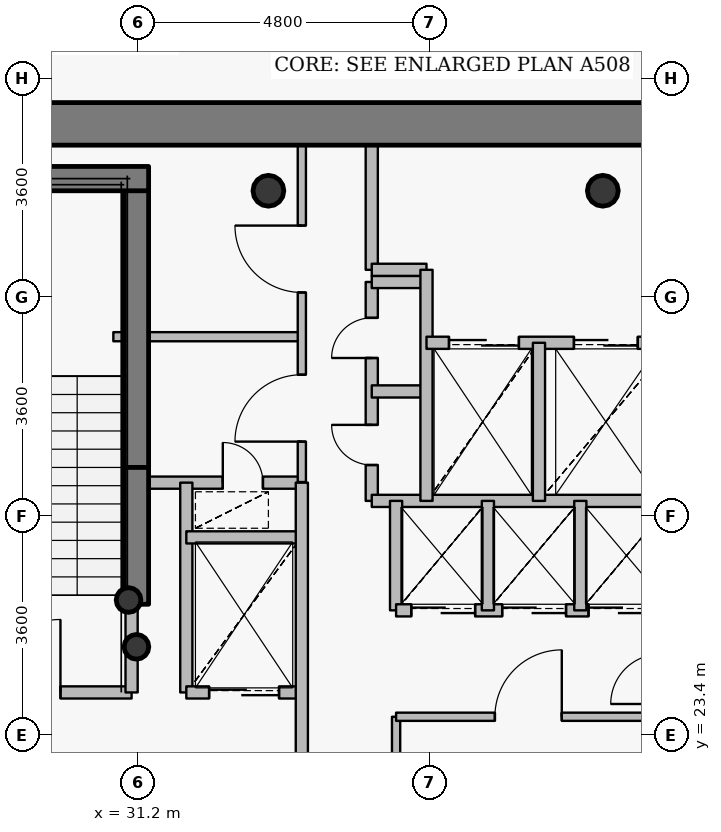
"""IFC4 building model, lengths in metres.
Left out: names, types, materials, properties, quantities, classifications, styles, units other than length and angle.
Written with IfcOpenShell. Run it as: python <this file> out.ifc"""

import sys

from ifc_helpers import new_model, si_unit, direction, frame, frame_2d, origin, origin_2d, place, context, subcontext, project, spatial, rectangle, hollow_circle, extrude, source, transform, mapped, element, fill, save


model = new_model("IFC4")
c1 = context("Model", 3, precision=1e-05, world=origin(), true_north=direction((0.0, 1.0)))
c2 = subcontext(c1, "Body", "Model", "MODEL_VIEW")
j1 = project(units=[si_unit("LENGTHUNIT", "METRE"), si_unit("PLANEANGLEUNIT", "RADIAN")], contexts=[c1])
p1 = place(None, origin())
s1 = spatial("IfcSite", under=j1, at=p1, CompositionType="ELEMENT")
p2 = place(p1, origin())
s2 = spatial("IfcBuilding", under=s1, at=p2, CompositionType="ELEMENT")
p3 = place(p2, frame((0.0, 0.0, 284.25)))
s3 = spatial("IfcBuildingStorey", under=s2, at=p3, CompositionType="ELEMENT", Elevation=284.25)
for number, where, z_axis, x_axis in (
    (1, (38.85, 32.35, 0.0), (0.0, 0.0, 1.0), (1.0, 0.0, 0.0)),
    (2, (33.35, 32.35, 0.0), (0.0, 0.0, 1.0), (1.0, 0.0, 0.0)),
):
    element("IfcColumn", number, at=place(p3, frame(where, z_axis=z_axis, x_axis=x_axis)), inside=s3, PredefinedType="COLUMN", context=c2, shape_type="SweptSolid", body=[
        extrude(hollow_circle(Radius=0.254, WallThickness=0.02, at=origin_2d()), origin(), (0.0, 0.0, 1.0), 3.75),
    ])
p4 = place(p3, frame((31.18, 27.8, 0.0), z_axis=(0.0, 0.0, 1.0), x_axis=(0.0, 1.0, 0.0)))
e3 = element("IfcWall", 3, at=p4, inside=s3, PredefinedType="SHEAR", context=c2, shape_type="SweptSolid", body=[
    extrude(rectangle(XDim=4.75, YDim=0.4, at=frame_2d((2.375, 0.0))), origin(), (0.0, 0.0, 1.0), 3.75),
])
p5 = place(p3, frame((27.25, 32.55, 0.0), z_axis=(0.0, 0.0, 1.0), x_axis=(1.0, 0.0, 0.0)))
e4 = element("IfcWall", 4, at=p5, inside=s3, PredefinedType="SHEAR", context=c2, shape_type="SweptSolid", body=[
    extrude(rectangle(XDim=4.13, YDim=0.4, at=frame_2d((2.065, 0.0))), origin(), (0.0, 0.0, 1.0), 3.75),
])
for number, where, z_axis, x_axis in (
    (5, (31.05, 25.62, 0.0), (0.0, 0.0, 1.0), (1.0, 0.0, 0.0)),
    (6, (31.18, 24.85, 0.0), (0.0, 0.0, 1.0), (1.0, 0.0, 0.0)),
):
    element("IfcColumn", number, at=place(p3, frame(where, z_axis=z_axis, x_axis=x_axis)), inside=s3, PredefinedType="COLUMN", context=c2, shape_type="SweptSolid", body=[
        extrude(hollow_circle(Radius=0.203, WallThickness=0.016, at=origin_2d()), origin(), (0.0, 0.0, 1.0), 3.75),
    ])
p6 = place(p3, frame((27.65, 33.45, 0.0), z_axis=(0.0, 0.0, 1.0), x_axis=(1.0, 0.0, 0.0)))
e7 = element("IfcWall", 7, at=p6, inside=s3, PredefinedType="SHEAR", context=c2, shape_type="SweptSolid", body=[
    extrude(rectangle(XDim=16.7, YDim=0.7, at=frame_2d((8.35, 0.0))), origin(), (0.0, 0.0, 1.0), 3.05),
])
p7 = place(p6, frame((12.775, 0.0, 0.0)))
e8 = element("IfcOpeningElement", 8, at=p7, cuts=e7, PredefinedType="OPENING", context=c2, shape_type="SweptSolid", body=[
    extrude(rectangle(XDim=1.15, YDim=2.15, at=origin_2d()), frame((0.575, 0.36, 1.075), z_axis=(0.0, -1.0, 0.0), x_axis=(1.0, 0.0, 0.0)), (0.0, 0.0, 1.0), 0.72),
])
p8 = place(p3, frame((31.18, 25.55, 0.0), z_axis=(0.0, 0.0, 1.0), x_axis=(0.0, 1.0, 0.0)))
e9 = element("IfcWall", 9, at=p8, inside=s3, PredefinedType="SHEAR", context=c2, shape_type="SweptSolid", body=[
    extrude(rectangle(XDim=2.25, YDim=0.4, at=frame_2d((1.125, 0.0))), origin(), (0.0, 0.0, 1.0), 3.1),
])
p9 = place(p3, frame((27.56, 24.1, 0.0), z_axis=(0.0, 0.0, 1.0), x_axis=(1.0, 0.0, 0.0)))
e10 = element("IfcWall", 10, at=p9, inside=s3, PredefinedType="PARTITIONING", context=c2, shape_type="SweptSolid", body=[
    extrude(rectangle(XDim=3.54, YDim=0.2, at=frame_2d((1.77, 0.0))), origin(), (0.0, 0.0, 1.0), 3.5),
])
p10 = place(p9, frame((1.17, 0.0, 0.0)))
e11 = element("IfcOpeningElement", 11, at=p10, cuts=e10, PredefinedType="OPENING", context=c2, shape_type="SweptSolid", body=[
    extrude(rectangle(XDim=1.2, YDim=2.15, at=origin_2d()), frame((0.6, 0.11, 1.075), z_axis=(0.0, -1.0, 0.0), x_axis=(1.0, 0.0, 0.0)), (0.0, 0.0, 1.0), 0.22),
])
p11 = place(p3, frame((30.8, 29.95, 0.0), z_axis=(0.0, 0.0, 1.0), x_axis=(1.0, 0.0, 0.0)))
e12 = element("IfcWall", 12, at=p11, inside=s3, PredefinedType="PARTITIONING", context=c2, shape_type="SweptSolid", body=[
    extrude(rectangle(XDim=3.1, YDim=0.15, at=frame_2d((1.55, 0.0))), origin(), (0.0, 0.0, 1.0), 3.085),
])
p12 = place(p3, frame((31.1, 24.1, 0.0), z_axis=(0.0, 0.0, 1.0), x_axis=(0.0, 1.0, 0.0)))
e13 = element("IfcWall", 13, at=p12, inside=s3, PredefinedType="PARTITIONING", context=c2, shape_type="SweptSolid", body=[
    extrude(rectangle(XDim=1.44, YDim=0.2, at=frame_2d((0.72, 0.0))), origin(), (0.0, 0.0, 1.0), 3.5),
])
p13 = place(p3, frame((31.1, 27.55, 0.0), z_axis=(0.0, 0.0, 1.0), x_axis=(1.0, 0.0, 0.0)))
e14 = element("IfcWall", 14, at=p13, inside=s3, PredefinedType="PARTITIONING", context=c2, shape_type="SweptSolid", body=[
    extrude(rectangle(XDim=2.8, YDim=0.2, at=frame_2d((1.4, 0.0))), origin(), (0.0, 0.0, 1.0), 3.085),
])
p14 = place(p13, frame((1.5, 0.0, 0.0)))
e15 = element("IfcOpeningElement", 15, at=p14, cuts=e14, PredefinedType="OPENING", context=c2, shape_type="SweptSolid", body=[
    extrude(rectangle(XDim=0.66, YDim=2.05, at=origin_2d()), frame((0.33, 0.11, 1.025), z_axis=(0.0, -1.0, 0.0), x_axis=(1.0, 0.0, 0.0)), (0.0, 0.0, 1.0), 0.22),
])
p15 = place(p3, frame((32.0, 24.1, 0.0), z_axis=(0.0, 0.0, 1.0), x_axis=(0.0, 1.0, 0.0)))
e16 = element("IfcWall", 16, at=p15, inside=s3, PredefinedType="PARTITIONING", context=c2, shape_type="SweptSolid", body=[
    extrude(rectangle(XDim=3.45, YDim=0.2, at=frame_2d((1.725, 0.0))), origin(), (0.0, 0.0, 1.0), 3.5),
])
p16 = place(p3, frame((32.0, 24.1, 0.0), z_axis=(0.0, 0.0, 1.0), x_axis=(1.0, 0.0, 0.0)))
e17 = element("IfcWall", 17, at=p16, inside=s3, PredefinedType="PARTITIONING", context=c2, shape_type="SweptSolid", body=[
    extrude(rectangle(XDim=1.9, YDim=0.2, at=frame_2d((0.95, 0.0))), origin(), (0.0, 0.0, 1.0), 3.085),
])
p17 = place(p16, frame((0.375, 0.0, 0.0)))
e18 = element("IfcOpeningElement", 18, at=p17, cuts=e17, PredefinedType="OPENING", context=c2, shape_type="SweptSolid", body=[
    extrude(rectangle(XDim=1.15, YDim=2.15, at=origin_2d()), frame((0.575, 0.11, 1.075), z_axis=(0.0, -1.0, 0.0), x_axis=(1.0, 0.0, 0.0)), (0.0, 0.0, 1.0), 0.22),
])
p18 = place(p3, frame((32.0, 26.65, 0.0), z_axis=(0.0, 0.0, 1.0), x_axis=(1.0, 0.0, 0.0)))
e19 = element("IfcWall", 19, at=p18, inside=s3, PredefinedType="PARTITIONING", context=c2, shape_type="SweptSolid", body=[
    extrude(rectangle(XDim=1.9, YDim=0.2, at=frame_2d((0.95, 0.0))), origin(), (0.0, 0.0, 1.0), 3.085),
])
p19 = place(p3, frame((33.9, 20.9, 0.0), z_axis=(0.0, 0.0, 1.0), x_axis=(0.0, 1.0, 0.0)))
e20 = element("IfcWall", 20, at=p19, inside=s3, PredefinedType="PARTITIONING", context=c2, shape_type="SweptSolid", body=[
    extrude(rectangle(XDim=6.65, YDim=0.2, at=frame_2d((3.325, 0.0))), origin(), (0.0, 0.0, 1.0), 3.085),
])
p20 = place(p3, frame((33.9, 27.56, 0.0), z_axis=(0.0, 0.0, 1.0), x_axis=(0.0, 1.0, 0.0)))
e21 = element("IfcWall", 21, at=p20, inside=s3, PredefinedType="PARTITIONING", context=c2, shape_type="SweptSolid", body=[
    extrude(rectangle(XDim=5.54, YDim=0.135, at=frame_2d((2.77, 0.0))), origin(), (0.0, 0.0, 1.0), 3.085),
])
p21 = place(p20, frame((0.665, 0.0, 0.0)))
e22 = element("IfcOpeningElement", 22, at=p21, cuts=e21, PredefinedType="OPENING", context=c2, shape_type="SweptSolid", body=[
    extrude(rectangle(XDim=1.1, YDim=2.15, at=origin_2d()), frame((0.55, 0.078, 1.075), z_axis=(0.0, -1.0, 0.0), x_axis=(1.0, 0.0, 0.0)), (0.0, 0.0, 1.0), 0.155),
])
p22 = place(p20, frame((3.117, 0.0, 0.0)))
e23 = element("IfcOpeningElement", 23, at=p22, cuts=e21, PredefinedType="OPENING", context=c2, shape_type="SweptSolid", body=[
    extrude(rectangle(XDim=1.1, YDim=2.15, at=origin_2d()), frame((0.55, 0.078, 1.075), z_axis=(0.0, -1.0, 0.0), x_axis=(1.0, 0.0, 0.0)), (0.0, 0.0, 1.0), 0.155),
])
p23 = place(p3, frame((35.05, 27.25, 0.0), z_axis=(0.0, 0.0, 1.0), x_axis=(0.0, 1.0, 0.0)))
e24 = element("IfcWall", 24, at=p23, inside=s3, PredefinedType="PARTITIONING", context=c2, shape_type="SweptSolid", body=[
    extrude(rectangle(XDim=3.6, YDim=0.2, at=frame_2d((1.8, 0.0))), origin(), (0.0, 0.0, 1.0), 3.5),
])
p24 = place(p23, frame((0.59, 0.0, 0.0)))
e25 = element("IfcOpeningElement", 25, at=p24, cuts=e24, PredefinedType="OPENING", context=c2, shape_type="SweptSolid", body=[
    extrude(rectangle(XDim=0.66, YDim=2.05, at=origin_2d()), frame((0.33, 0.11, 1.025), z_axis=(0.0, -1.0, 0.0), x_axis=(1.0, 0.0, 0.0)), (0.0, 0.0, 1.0), 0.22),
])
p25 = place(p23, frame((2.35, 0.0, 0.0)))
e26 = element("IfcOpeningElement", 26, at=p25, cuts=e24, PredefinedType="OPENING", context=c2, shape_type="SweptSolid", body=[
    extrude(rectangle(XDim=0.66, YDim=2.05, at=origin_2d()), frame((0.33, 0.11, 1.025), z_axis=(0.0, -1.0, 0.0), x_axis=(1.0, 0.0, 0.0)), (0.0, 0.0, 1.0), 0.22),
])
p26 = place(p3, frame((35.05, 27.25, 0.0), z_axis=(0.0, 0.0, 1.0), x_axis=(1.0, 0.0, 0.0)))
e27 = element("IfcWall", 27, at=p26, inside=s3, PredefinedType="PARTITIONING", context=c2, shape_type="SweptSolid", body=[
    extrude(rectangle(XDim=4.95, YDim=0.2, at=frame_2d((2.475, 0.0))), origin(), (0.0, 0.0, 1.0), 3.085),
])
for number, where, z_axis, x_axis in (
    (28, (35.05, 29.05, 0.0), (0.0, 0.0, 1.0), (1.0, 0.0, 0.0)),
    (29, (35.05, 30.85, 0.0), (0.0, 0.0, 1.0), (1.0, 0.0, 0.0)),
):
    element("IfcWall", number, at=place(p3, frame(where, z_axis=z_axis, x_axis=x_axis)), inside=s3, PredefinedType="PARTITIONING", context=c2, shape_type="SweptSolid", body=[
        extrude(rectangle(XDim=0.9, YDim=0.2, at=frame_2d((0.45, 0.0))), origin(), (0.0, 0.0, 1.0), 3.5),
    ])
p27 = place(p3, frame((35.05, 31.05, 0.0), z_axis=(0.0, 0.0, 1.0), x_axis=(0.0, 1.0, 0.0)))
e30 = element("IfcWall", 30, at=p27, inside=s3, PredefinedType="PARTITIONING", context=c2, shape_type="SweptSolid", body=[
    extrude(rectangle(XDim=2.05, YDim=0.2, at=frame_2d((1.025, 0.0))), origin(), (0.0, 0.0, 1.0), 3.085),
])
p28 = place(p3, frame((35.05, 31.05, 0.0), z_axis=(0.0, 0.0, 1.0), x_axis=(1.0, 0.0, 0.0)))
e31 = element("IfcWall", 31, at=p28, inside=s3, PredefinedType="PARTITIONING", context=c2, shape_type="SweptSolid", body=[
    extrude(rectangle(XDim=0.9, YDim=0.2, at=frame_2d((0.45, 0.0))), origin(), (0.0, 0.0, 1.0), 3.5),
])
p29 = place(p3, frame((35.45, 20.9, 0.0), z_axis=(0.0, 0.0, 1.0), x_axis=(0.0, 1.0, 0.0)))
e32 = element("IfcWall", 32, at=p29, inside=s3, PredefinedType="PARTITIONING", context=c2, shape_type="SweptSolid", body=[
    extrude(rectangle(XDim=2.8, YDim=0.135, at=frame_2d((1.4, 0.0))), origin(), (0.0, 0.0, 1.0), 3.085),
])
p30 = place(p3, frame((35.45, 23.7, 0.0), z_axis=(0.0, 0.0, 1.0), x_axis=(1.0, 0.0, 0.0)))
e33 = element("IfcWall", 33, at=p30, inside=s3, PredefinedType="PARTITIONING", context=c2, shape_type="SweptSolid", body=[
    extrude(rectangle(XDim=4.35, YDim=0.135, at=frame_2d((2.175, 0.0))), origin(), (0.0, 0.0, 1.0), 3.085),
])
p31 = place(p30, frame((1.625, 0.0, 0.0)))
e34 = element("IfcOpeningElement", 34, at=p31, cuts=e33, PredefinedType="OPENING", context=c2, shape_type="SweptSolid", body=[
    extrude(rectangle(XDim=1.1, YDim=2.15, at=origin_2d()), frame((0.55, 0.078, 1.075), z_axis=(0.0, -1.0, 0.0), x_axis=(1.0, 0.0, 0.0)), (0.0, 0.0, 1.0), 0.155),
])
p32 = place(p3, frame((35.45, 25.45, 0.0), z_axis=(0.0, 0.0, 1.0), x_axis=(0.0, 1.0, 0.0)))
e35 = element("IfcWall", 35, at=p32, inside=s3, PredefinedType="PARTITIONING", context=c2, shape_type="SweptSolid", body=[
    extrude(rectangle(XDim=1.8, YDim=0.2, at=frame_2d((0.9, 0.0))), origin(), (0.0, 0.0, 1.0), 3.5),
])
p33 = place(p3, frame((35.45, 25.45, 0.0), z_axis=(0.0, 0.0, 1.0), x_axis=(1.0, 0.0, 0.0)))
e36 = element("IfcWall", 36, at=p33, inside=s3, PredefinedType="PARTITIONING", context=c2, shape_type="SweptSolid", body=[
    extrude(rectangle(XDim=4.55, YDim=0.2, at=frame_2d((2.275, 0.0))), origin(), (0.0, 0.0, 1.0), 3.085),
])
p34 = place(p33, frame((0.25, 0.0, 0.0)))
e37 = element("IfcOpeningElement", 37, at=p34, cuts=e36, PredefinedType="OPENING", context=c2, shape_type="SweptSolid", body=[
    extrude(rectangle(XDim=1.05, YDim=2.15, at=origin_2d()), frame((0.525, 0.11, 1.075), z_axis=(0.0, -1.0, 0.0), x_axis=(1.0, 0.0, 0.0)), (0.0, 0.0, 1.0), 0.22),
])
p35 = place(p33, frame((1.745, 0.0, 0.0)))
e38 = element("IfcOpeningElement", 38, at=p35, cuts=e36, PredefinedType="OPENING", context=c2, shape_type="SweptSolid", body=[
    extrude(rectangle(XDim=1.05, YDim=2.15, at=origin_2d()), frame((0.525, 0.11, 1.075), z_axis=(0.0, -1.0, 0.0), x_axis=(1.0, 0.0, 0.0)), (0.0, 0.0, 1.0), 0.22),
])
p36 = place(p33, frame((3.165, 0.0, 0.0)))
e39 = element("IfcOpeningElement", 39, at=p36, cuts=e36, PredefinedType="OPENING", context=c2, shape_type="SweptSolid", body=[
    extrude(rectangle(XDim=1.05, YDim=2.15, at=origin_2d()), frame((0.525, 0.11, 1.075), z_axis=(0.0, -1.0, 0.0), x_axis=(1.0, 0.0, 0.0)), (0.0, 0.0, 1.0), 0.22),
])
p37 = place(p3, frame((35.95, 27.25, 0.0), z_axis=(0.0, 0.0, 1.0), x_axis=(0.0, 1.0, 0.0)))
e40 = element("IfcWall", 40, at=p37, inside=s3, PredefinedType="PARTITIONING", context=c2, shape_type="SweptSolid", body=[
    extrude(rectangle(XDim=3.8, YDim=0.2, at=frame_2d((1.9, 0.0))), origin(), (0.0, 0.0, 1.0), 3.5),
])
p38 = place(p3, frame((35.95, 29.85, 0.0), z_axis=(0.0, 0.0, 1.0), x_axis=(1.0, 0.0, 0.0)))
e41 = element("IfcWall", 41, at=p38, inside=s3, PredefinedType="PARTITIONING", context=c2, shape_type="SweptSolid", body=[
    extrude(rectangle(XDim=8.49, YDim=0.2, at=frame_2d((4.245, 0.0))), origin(), (0.0, 0.0, 1.0), 3.085),
])
p39 = place(p38, frame((6.1, 0.0, 0.0)))
e42 = element("IfcOpeningElement", 42, at=p39, cuts=e41, PredefinedType="OPENING", context=c2, shape_type="SweptSolid", body=[
    extrude(rectangle(XDim=1.2, YDim=2.15, at=origin_2d()), frame((0.6, 0.11, 1.075), z_axis=(0.0, -1.0, 0.0), x_axis=(1.0, 0.0, 0.0)), (0.0, 0.0, 1.0), 0.22),
])
p40 = place(p38, frame((0.37, 0.0, 0.0)))
e43 = element("IfcOpeningElement", 43, at=p40, cuts=e41, PredefinedType="OPENING", context=c2, shape_type="SweptSolid", body=[
    extrude(rectangle(XDim=1.15, YDim=2.15, at=origin_2d()), frame((0.575, 0.11, 1.075), z_axis=(0.0, -1.0, 0.0), x_axis=(1.0, 0.0, 0.0)), (0.0, 0.0, 1.0), 0.22),
])
p41 = place(p38, frame((2.425, 0.0, 0.0)))
e44 = element("IfcOpeningElement", 44, at=p41, cuts=e41, PredefinedType="OPENING", context=c2, shape_type="SweptSolid", body=[
    extrude(rectangle(XDim=1.05, YDim=2.15, at=origin_2d()), frame((0.525, 0.11, 1.075), z_axis=(0.0, -1.0, 0.0), x_axis=(1.0, 0.0, 0.0)), (0.0, 0.0, 1.0), 0.22),
])
p42 = place(p3, frame((36.96, 25.45, 0.0), z_axis=(0.0, 0.0, 1.0), x_axis=(0.0, 1.0, 0.0)))
e45 = element("IfcWall", 45, at=p42, inside=s3, PredefinedType="PARTITIONING", context=c2, shape_type="SweptSolid", body=[
    extrude(rectangle(XDim=1.8, YDim=0.2, at=frame_2d((0.9, 0.0))), origin(), (0.0, 0.0, 1.0), 3.5),
])
p43 = place(p3, frame((37.8, 27.25, 0.0), z_axis=(0.0, 0.0, 1.0), x_axis=(0.0, 1.0, 0.0)))
e46 = element("IfcWall", 46, at=p43, inside=s3, PredefinedType="PARTITIONING", context=c2, shape_type="SweptSolid", body=[
    extrude(rectangle(XDim=2.6, YDim=0.2, at=frame_2d((1.3, 0.0))), origin(), (0.0, 0.0, 1.0), 3.5),
])
p44 = place(p3, frame((38.48, 25.45, 0.0), z_axis=(0.0, 0.0, 1.0), x_axis=(0.0, 1.0, 0.0)))
e47 = element("IfcWall", 47, at=p44, inside=s3, PredefinedType="PARTITIONING", context=c2, shape_type="SweptSolid", body=[
    extrude(rectangle(XDim=1.8, YDim=0.2, at=frame_2d((0.9, 0.0))), origin(), (0.0, 0.0, 1.0), 3.5),
])
m1 = source(origin(), c2, "Body", "SweptSolid", [
    extrude(rectangle(XDim=1.2, YDim=2.15, at=origin_2d()), frame((0.6, 0.025, 1.075), z_axis=(0.0, -1.0, 0.0), x_axis=(1.0, 0.0, 0.0)), (0.0, 0.0, 1.0), 0.05),
])
p45 = place(p10, origin())
e48 = element("IfcDoor", 48, at=p45, inside=s3, OperationType="SINGLE_SWING_RIGHT", PredefinedType="DOOR", context=c2, shape_type="MappedRepresentation", body=[
    mapped(m1, transform((0.0, 0.0, 0.0), x_axis=(1.0, 0.0, 0.0), y_axis=(0.0, 1.0, 0.0), z_axis=(0.0, 0.0, 1.0), scale=1.0)),
])
fill(e11, e48)
m2 = source(origin(), c2, "Body", "SweptSolid", [
    extrude(rectangle(XDim=1.15, YDim=2.15, at=origin_2d()), frame((0.575, 0.025, 1.075), z_axis=(0.0, -1.0, 0.0), x_axis=(1.0, 0.0, 0.0)), (0.0, 0.0, 1.0), 0.05),
])
p46 = place(p40, origin())
e49 = element("IfcDoor", 49, at=p46, inside=s3, OperationType="DOUBLE_DOOR_SLIDING", PredefinedType="USERDEFINED", context=c2, shape_type="MappedRepresentation", body=[
    mapped(m2, transform((0.0, 0.0, 0.0), x_axis=(1.0, 0.0, 0.0), y_axis=(0.0, 1.0, 0.0), z_axis=(0.0, 0.0, 1.0), scale=1.0)),
])
fill(e43, e49)
p47 = place(p17, origin())
e50 = element("IfcDoor", 50, at=p47, inside=s3, OperationType="DOUBLE_DOOR_SLIDING", PredefinedType="USERDEFINED", context=c2, shape_type="MappedRepresentation", body=[
    mapped(m2, transform((0.0, 0.0, 0.0), x_axis=(1.0, 0.0, 0.0), y_axis=(0.0, 1.0, 0.0), z_axis=(0.0, 0.0, 1.0), scale=1.0)),
])
fill(e18, e50)
m3 = source(origin(), c2, "Body", "SweptSolid", [
    extrude(rectangle(XDim=1.05, YDim=2.15, at=origin_2d()), frame((0.525, 0.025, 1.075), z_axis=(0.0, -1.0, 0.0), x_axis=(1.0, 0.0, 0.0)), (0.0, 0.0, 1.0), 0.05),
])
p48 = place(p41, origin())
e51 = element("IfcDoor", 51, at=p48, inside=s3, OperationType="DOUBLE_DOOR_SLIDING", PredefinedType="USERDEFINED", context=c2, shape_type="MappedRepresentation", body=[
    mapped(m3, transform((0.0, 0.0, 0.0), x_axis=(1.0, 0.0, 0.0), y_axis=(0.0, 1.0, 0.0), z_axis=(0.0, 0.0, 1.0), scale=1.0)),
])
fill(e44, e51)
p49 = place(p34, origin())
e52 = element("IfcDoor", 52, at=p49, inside=s3, OperationType="DOUBLE_DOOR_SLIDING", PredefinedType="USERDEFINED", context=c2, shape_type="MappedRepresentation", body=[
    mapped(m3, transform((0.0, 0.0, 0.0), x_axis=(1.0, 0.0, 0.0), y_axis=(0.0, 1.0, 0.0), z_axis=(0.0, 0.0, 1.0), scale=1.0)),
])
fill(e37, e52)
p50 = place(p35, origin())
e53 = element("IfcDoor", 53, at=p50, inside=s3, OperationType="DOUBLE_DOOR_SLIDING", PredefinedType="USERDEFINED", context=c2, shape_type="MappedRepresentation", body=[
    mapped(m3, transform((0.0, 0.0, 0.0), x_axis=(1.0, 0.0, 0.0), y_axis=(0.0, 1.0, 0.0), z_axis=(0.0, 0.0, 1.0), scale=1.0)),
])
fill(e38, e53)
p51 = place(p36, origin())
e54 = element("IfcDoor", 54, at=p51, inside=s3, OperationType="DOUBLE_DOOR_SLIDING", PredefinedType="USERDEFINED", context=c2, shape_type="MappedRepresentation", body=[
    mapped(m3, transform((0.0, 0.0, 0.0), x_axis=(1.0, 0.0, 0.0), y_axis=(0.0, 1.0, 0.0), z_axis=(0.0, 0.0, 1.0), scale=1.0)),
])
fill(e39, e54)
m4 = source(origin(), c2, "Body", "SweptSolid", [
    extrude(rectangle(XDim=0.66, YDim=2.05, at=origin_2d()), frame((0.33, 0.025, 1.025), z_axis=(0.0, -1.0, 0.0), x_axis=(1.0, 0.0, 0.0)), (0.0, 0.0, 1.0), 0.05),
])
p52 = place(p24, origin())
e55 = element("IfcDoor", 55, at=p52, inside=s3, OperationType="SINGLE_SWING_RIGHT", PredefinedType="USERDEFINED", context=c2, shape_type="MappedRepresentation", body=[
    mapped(m4, transform((0.0, 0.0, 0.0), x_axis=(1.0, 0.0, 0.0), y_axis=(0.0, 1.0, 0.0), z_axis=(0.0, 0.0, 1.0), scale=1.0)),
])
fill(e25, e55)
p53 = place(p25, origin())
e56 = element("IfcDoor", 56, at=p53, inside=s3, OperationType="SINGLE_SWING_LEFT", PredefinedType="USERDEFINED", context=c2, shape_type="MappedRepresentation", body=[
    mapped(m4, transform((0.0, 0.0, 0.0), x_axis=(1.0, 0.0, 0.0), y_axis=(0.0, 1.0, 0.0), z_axis=(0.0, 0.0, 1.0), scale=1.0)),
])
fill(e26, e56)
m5 = source(origin(), c2, "Body", "SweptSolid", [
    extrude(rectangle(XDim=1.1, YDim=2.15, at=origin_2d()), frame((0.55, 0.025, 1.075), z_axis=(0.0, -1.0, 0.0), x_axis=(1.0, 0.0, 0.0)), (0.0, 0.0, 1.0), 0.05),
])
p54 = place(p31, origin())
e57 = element("IfcDoor", 57, at=p54, inside=s3, OperationType="SINGLE_SWING_RIGHT", PredefinedType="DOOR", context=c2, shape_type="MappedRepresentation", body=[
    mapped(m5, transform((0.0, 0.0, 0.0), x_axis=(1.0, 0.0, 0.0), y_axis=(0.0, 1.0, 0.0), z_axis=(0.0, 0.0, 1.0), scale=1.0)),
])
fill(e34, e57)
p55 = place(p21, origin())
e58 = element("IfcDoor", 58, at=p55, inside=s3, OperationType="SINGLE_SWING_LEFT", PredefinedType="DOOR", context=c2, shape_type="MappedRepresentation", body=[
    mapped(m5, transform((0.0, 0.0, 0.0), x_axis=(1.0, 0.0, 0.0), y_axis=(0.0, 1.0, 0.0), z_axis=(0.0, 0.0, 1.0), scale=1.0)),
])
fill(e22, e58)
p56 = place(p22, origin())
e59 = element("IfcDoor", 59, at=p56, inside=s3, OperationType="SINGLE_SWING_RIGHT", PredefinedType="DOOR", context=c2, shape_type="MappedRepresentation", body=[
    mapped(m5, transform((0.0, 0.0, 0.0), x_axis=(1.0, 0.0, 0.0), y_axis=(0.0, 1.0, 0.0), z_axis=(0.0, 0.0, 1.0), scale=1.0)),
])
fill(e23, e59)
p57 = place(p14, origin())
e60 = element("IfcDoor", 60, at=p57, inside=s3, OperationType="SINGLE_SWING_LEFT", PredefinedType="USERDEFINED", context=c2, shape_type="MappedRepresentation", body=[
    mapped(m4, transform((0.0, 0.0, 0.0), x_axis=(1.0, 0.0, 0.0), y_axis=(0.0, 1.0, 0.0), z_axis=(0.0, 0.0, 1.0), scale=1.0)),
])
fill(e15, e60)
save(model, sys.argv[1])
